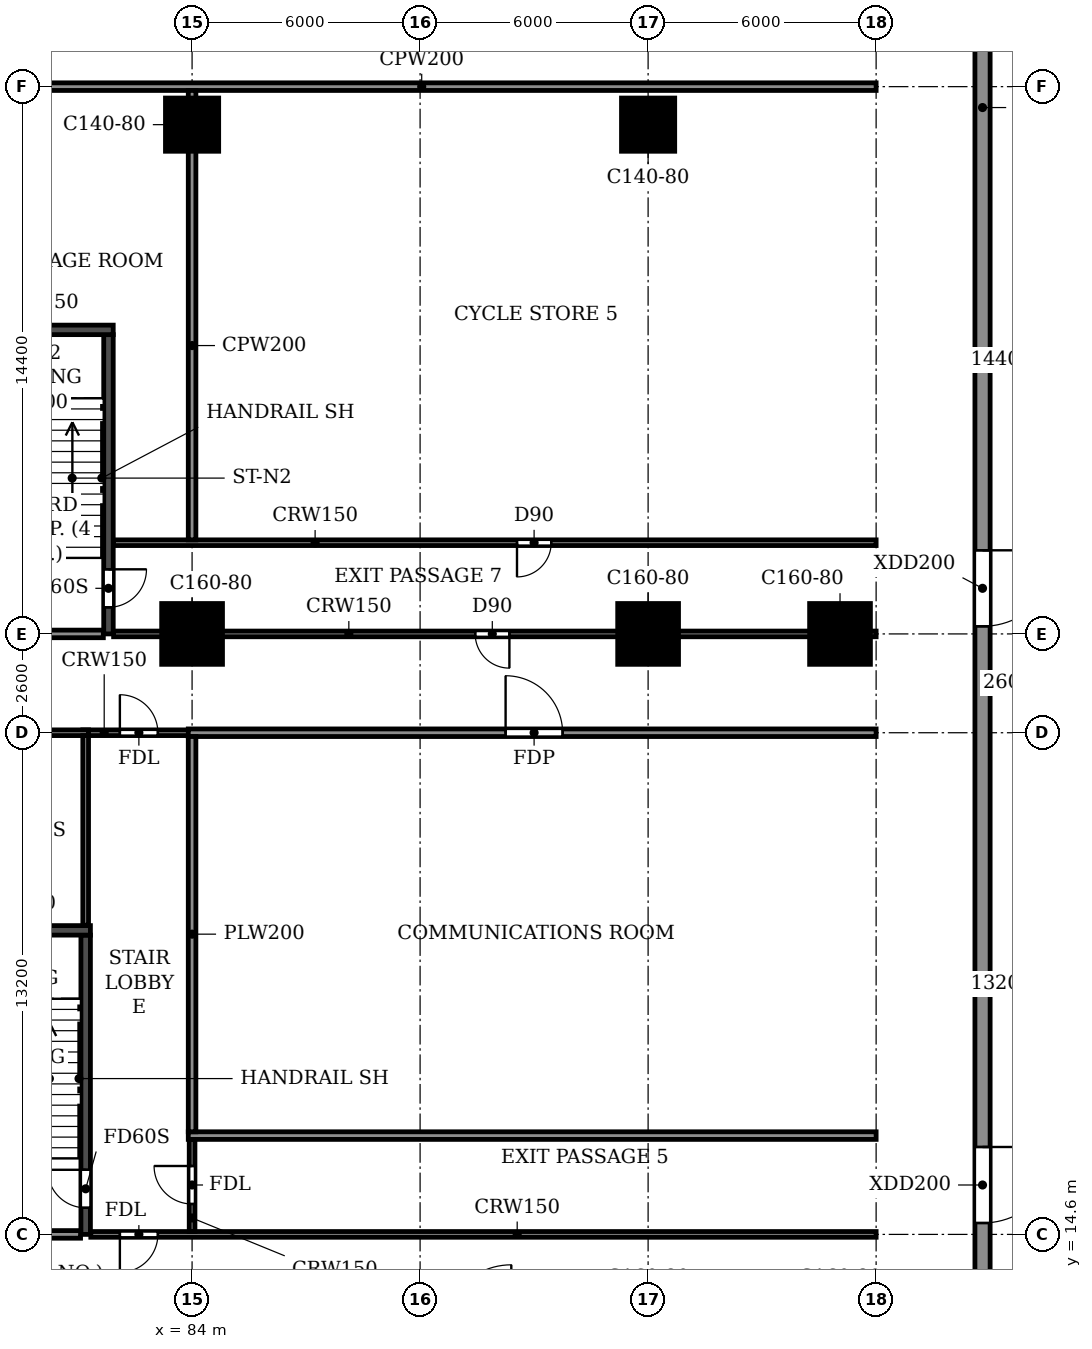
"""IFC4 building model, lengths in metres.
Left out: names, types, materials, properties, quantities, classifications, styles, units other than length and angle.
Written with IfcOpenShell. Run it as: python <this file> out.ifc"""

import sys

from ifc_helpers import new_model, si_unit, direction, frame, frame_2d, origin, origin_2d, place, context, subcontext, project, spatial, rectangle, extrude, source, transform, mapped, element, fill, save


model = new_model("IFC4")
c1 = context("Model", 3, precision=1e-05, world=origin(), true_north=direction((0.0, 1.0)))
c2 = subcontext(c1, "Body", "Model", "MODEL_VIEW")
j1 = project(units=[si_unit("LENGTHUNIT", "METRE"), si_unit("PLANEANGLEUNIT", "RADIAN")], contexts=[c1])
p1 = place(None, origin())
s1 = spatial("IfcSite", under=j1, at=p1, CompositionType="ELEMENT")
p2 = place(p1, origin())
s2 = spatial("IfcBuilding", under=s1, at=p2, CompositionType="ELEMENT")
p3 = place(p2, origin())
s3 = spatial("IfcBuildingStorey", under=s2, at=p3, CompositionType="ELEMENT", Elevation=0.0)
m1 = source(origin(), c2, "Body", "SweptSolid", [
    extrude(rectangle(XDim=1.6, YDim=1.6, at=origin_2d()), origin(), (0.0, 0.0, 1.0), 4.5),
])
p4 = place(p3, frame((84.0, 30.4, -0.3), z_axis=(0.0, 0.0, 1.0), x_axis=(1.0, 0.0, 0.0)))
e1 = element("IfcColumn", 1, at=p4, inside=s3, PredefinedType="COLUMN", context=c2, shape_type="MappedRepresentation", body=[
    mapped(m1, transform((0.0, 0.0, 0.0))),
])
m2 = source(origin(), c2, "Body", "SweptSolid", [
    extrude(rectangle(XDim=1.4, YDim=1.4, at=origin_2d()), origin(), (0.0, 0.0, 1.0), 4.5),
])
p5 = place(p3, frame((84.0, 43.8, -0.3), z_axis=(0.0, 0.0, 1.0), x_axis=(1.0, 0.0, 0.0)))
e2 = element("IfcColumn", 2, at=p5, inside=s3, PredefinedType="COLUMN", context=c2, shape_type="MappedRepresentation", body=[
    mapped(m2, transform((0.0, 0.0, 0.0))),
])
p6 = place(p3, frame((96.0, 30.4, -0.3), z_axis=(0.0, 0.0, 1.0), x_axis=(1.0, 0.0, 0.0)))
e3 = element("IfcColumn", 3, at=p6, inside=s3, PredefinedType="COLUMN", context=c2, shape_type="MappedRepresentation", body=[
    mapped(m1, transform((0.0, 0.0, 0.0))),
])
p7 = place(p3, frame((96.0, 43.8, -0.3), z_axis=(0.0, 0.0, 1.0), x_axis=(1.0, 0.0, 0.0)))
e4 = element("IfcColumn", 4, at=p7, inside=s3, PredefinedType="COLUMN", context=c2, shape_type="MappedRepresentation", body=[
    mapped(m2, transform((0.0, 0.0, 0.0))),
])
p8 = place(p3, frame((101.05, 30.4, -0.3), z_axis=(0.0, 0.0, 1.0), x_axis=(1.0, 0.0, 0.0)))
e5 = element("IfcColumn", 5, at=p8, inside=s3, PredefinedType="COLUMN", context=c2, shape_type="MappedRepresentation", body=[
    mapped(m1, transform((0.0, 0.0, 0.0))),
])
p9 = place(p3, frame((81.2, 14.6, 0.0), z_axis=(0.0, 0.0, 1.0), x_axis=(0.0, 1.0, 0.0)))
e6 = element("IfcWall", 6, at=p9, inside=s3, PredefinedType="SOLIDWALL", context=c2, shape_type="SweptSolid", body=[
    extrude(rectangle(XDim=7.875, YDim=0.25, at=frame_2d((3.938, 0.0))), origin(), (0.0, 0.0, 1.0), 4.2),
])
p10 = place(p9, frame((0.7, 0.0, 0.0)))
e7 = element("IfcOpeningElement", 7, at=p10, cuts=e6, PredefinedType="OPENING", context=c2, shape_type="SweptSolid", body=[
    extrude(rectangle(XDim=1.0, YDim=2.1, at=frame_2d((0.5, 1.05))), frame((0.0, 0.135, 0.0), z_axis=(0.0, -1.0, 0.0), x_axis=(1.0, 0.0, 0.0)), (0.0, 0.0, 1.0), 0.27),
])
p11 = place(p3, frame((77.275, 22.6, 0.0), z_axis=(0.0, 0.0, 1.0), x_axis=(1.0, 0.0, 0.0)))
e8 = element("IfcWall", 8, at=p11, inside=s3, PredefinedType="SOLIDWALL", context=c2, shape_type="SweptSolid", body=[
    extrude(rectangle(XDim=4.05, YDim=0.25, at=frame_2d((2.025, 0.0))), origin(), (0.0, 0.0, 1.0), 4.2),
])
p12 = place(p3, frame((81.8, 30.4, 0.0), z_axis=(0.0, 0.0, 1.0), x_axis=(0.0, 1.0, 0.0)))
e9 = element("IfcWall", 9, at=p12, inside=s3, PredefinedType="SOLIDWALL", context=c2, shape_type="SweptSolid", body=[
    extrude(rectangle(XDim=7.875, YDim=0.25, at=frame_2d((3.938, 0.0))), origin(), (0.0, 0.0, 1.0), 4.2),
])
p13 = place(p12, frame((0.7, 0.0, 0.0)))
e10 = element("IfcOpeningElement", 10, at=p13, cuts=e9, PredefinedType="OPENING", context=c2, shape_type="SweptSolid", body=[
    extrude(rectangle(XDim=1.0, YDim=2.1, at=frame_2d((0.5, 1.05))), frame((0.0, 0.135, 0.0), z_axis=(0.0, -1.0, 0.0), x_axis=(1.0, 0.0, 0.0)), (0.0, 0.0, 1.0), 0.27),
])
p14 = place(p3, frame((77.875, 38.4, 0.0), z_axis=(0.0, 0.0, 1.0), x_axis=(1.0, 0.0, 0.0)))
e11 = element("IfcWall", 11, at=p14, inside=s3, PredefinedType="SOLIDWALL", context=c2, shape_type="SweptSolid", body=[
    extrude(rectangle(XDim=4.05, YDim=0.25, at=frame_2d((2.025, 0.0))), origin(), (0.0, 0.0, 1.0), 4.2),
])
p15 = place(p3, frame((104.8, 0.2, 0.0), z_axis=(0.0, 0.0, 1.0), x_axis=(0.0, 1.0, 0.0)))
e12 = element("IfcWall", 12, at=p15, inside=s3, PredefinedType="STANDARD", context=c2, shape_type="SweptSolid", body=[
    extrude(rectangle(XDim=74.4, YDim=0.4, at=frame_2d((37.2, 0.0))), origin(), (0.0, 0.0, 1.0), 5.68),
])
p16 = place(p15, frame((67.1, 0.0, 0.9)))
e13 = element("IfcOpeningElement", 13, at=p16, cuts=e12, PredefinedType="OPENING", context=c2, shape_type="SweptSolid", body=[
    extrude(rectangle(XDim=2.2, YDim=2.7, at=frame_2d((1.1, 1.35))), frame((0.0, 0.21, 0.0), z_axis=(0.0, -1.0, 0.0), x_axis=(1.0, 0.0, 0.0)), (0.0, 0.0, 1.0), 0.42),
])
p17 = place(p15, frame((56.3, 0.0, 0.0)))
e14 = element("IfcOpeningElement", 14, at=p17, cuts=e12, PredefinedType="OPENING", context=c2, shape_type="SweptSolid", body=[
    extrude(rectangle(XDim=3.6, YDim=4.5, at=frame_2d((1.8, 2.25))), frame((0.0, 0.21, 0.0), z_axis=(0.0, -1.0, 0.0), x_axis=(1.0, 0.0, 0.0)), (0.0, 0.0, 1.0), 0.42),
])
p18 = place(p15, frame((60.3, 0.0, 0.0)))
e15 = element("IfcOpeningElement", 15, at=p18, cuts=e12, PredefinedType="OPENING", context=c2, shape_type="SweptSolid", body=[
    extrude(rectangle(XDim=1.0, YDim=2.1, at=frame_2d((0.5, 1.05))), frame((0.0, 0.21, 0.0), z_axis=(0.0, -1.0, 0.0), x_axis=(1.0, 0.0, 0.0)), (0.0, 0.0, 1.0), 0.42),
])
p19 = place(p15, frame((14.7, 0.0, 0.0)))
e16 = element("IfcOpeningElement", 16, at=p19, cuts=e12, PredefinedType="OPENING", context=c2, shape_type="SweptSolid", body=[
    extrude(rectangle(XDim=2.0, YDim=2.4, at=frame_2d((1.0, 1.2))), frame((0.0, 0.21, 0.0), z_axis=(0.0, -1.0, 0.0), x_axis=(1.0, 0.0, 0.0)), (0.0, 0.0, 1.0), 0.42),
])
p20 = place(p15, frame((30.4, 0.0, 0.0)))
e17 = element("IfcOpeningElement", 17, at=p20, cuts=e12, PredefinedType="OPENING", context=c2, shape_type="SweptSolid", body=[
    extrude(rectangle(XDim=2.0, YDim=2.4, at=frame_2d((1.0, 1.2))), frame((0.0, 0.21, 0.0), z_axis=(0.0, -1.0, 0.0), x_axis=(1.0, 0.0, 0.0)), (0.0, 0.0, 1.0), 0.42),
])
p21 = place(p3, frame((81.335, 14.6, 0.0), z_axis=(0.0, 0.0, 1.0), x_axis=(1.0, 0.0, 0.0)))
e18 = element("IfcWall", 18, at=p21, inside=s3, PredefinedType="PARTITIONING", context=c2, shape_type="SweptSolid", body=[
    extrude(rectangle(XDim=20.665, YDim=0.15, at=frame_2d((10.333, 0.0))), origin(), (0.0, 0.0, 1.0), 4.2),
])
p22 = place(p21, frame((0.765, 0.0, 0.0)))
e19 = element("IfcOpeningElement", 19, at=p22, cuts=e18, PredefinedType="OPENING", context=c2, shape_type="SweptSolid", body=[
    extrude(rectangle(XDim=1.0, YDim=2.1, at=frame_2d((0.5, 1.05))), frame((0.0, 0.085, 0.0), z_axis=(0.0, -1.0, 0.0), x_axis=(1.0, 0.0, 0.0)), (0.0, 0.0, 1.0), 0.17),
])
p23 = place(p3, frame((81.125, 27.8, 0.0), z_axis=(0.0, 0.0, 1.0), x_axis=(1.0, 0.0, 0.0)))
e20 = element("IfcWall", 20, at=p23, inside=s3, PredefinedType="PARTITIONING", context=c2, shape_type="SweptSolid", body=[
    extrude(rectangle(XDim=2.975, YDim=0.15, at=frame_2d((1.488, 0.0))), origin(), (0.0, 0.0, 1.0), 4.2),
])
p24 = place(p23, frame((0.975, 0.0, 0.0)))
e21 = element("IfcOpeningElement", 21, at=p24, cuts=e20, PredefinedType="OPENING", context=c2, shape_type="SweptSolid", body=[
    extrude(rectangle(XDim=1.0, YDim=2.1, at=frame_2d((0.5, 1.05))), frame((0.0, 0.085, 0.0), z_axis=(0.0, -1.0, 0.0), x_axis=(1.0, 0.0, 0.0)), (0.0, 0.0, 1.0), 0.17),
])
p25 = place(p3, frame((81.935, 30.4, 0.0), z_axis=(0.0, 0.0, 1.0), x_axis=(1.0, 0.0, 0.0)))
e22 = element("IfcWall", 22, at=p25, inside=s3, PredefinedType="PARTITIONING", context=c2, shape_type="SweptSolid", body=[
    extrude(rectangle(XDim=20.065, YDim=0.15, at=frame_2d((10.032, 0.0))), origin(), (0.0, 0.0, 1.0), 4.2),
])
p26 = place(p25, frame((9.515, 0.0, 0.0)))
e23 = element("IfcOpeningElement", 23, at=p26, cuts=e22, PredefinedType="OPENING", context=c2, shape_type="SweptSolid", body=[
    extrude(rectangle(XDim=0.9, YDim=2.1, at=frame_2d((0.45, 1.05))), frame((0.0, 0.085, 0.0), z_axis=(0.0, -1.0, 0.0), x_axis=(1.0, 0.0, 0.0)), (0.0, 0.0, 1.0), 0.17),
])
p27 = place(p3, frame((81.935, 32.8, 0.0), z_axis=(0.0, 0.0, 1.0), x_axis=(1.0, 0.0, 0.0)))
e24 = element("IfcWall", 24, at=p27, inside=s3, PredefinedType="PARTITIONING", context=c2, shape_type="SweptSolid", body=[
    extrude(rectangle(XDim=20.065, YDim=0.15, at=frame_2d((10.032, 0.0))), origin(), (0.0, 0.0, 1.0), 4.2),
])
p28 = place(p27, frame((10.615, 0.0, 0.0)))
e25 = element("IfcOpeningElement", 25, at=p28, cuts=e24, PredefinedType="OPENING", context=c2, shape_type="SweptSolid", body=[
    extrude(rectangle(XDim=0.9, YDim=2.1, at=frame_2d((0.45, 1.05))), frame((0.0, 0.085, 0.0), z_axis=(0.0, -1.0, 0.0), x_axis=(1.0, 0.0, 0.0)), (0.0, 0.0, 1.0), 0.17),
])
p29 = place(p3, frame((84.0, 14.675, 0.0), z_axis=(0.0, 0.0, 1.0), x_axis=(0.0, 1.0, 0.0)))
e26 = element("IfcWall", 26, at=p29, inside=s3, PredefinedType="PARTITIONING", context=c2, shape_type="SweptSolid", body=[
    extrude(rectangle(XDim=2.425, YDim=0.15, at=frame_2d((1.212, 0.0))), origin(), (0.0, 0.0, 1.0), 4.2),
])
p30 = place(p29, frame((0.725, 0.0, 0.0)))
e27 = element("IfcOpeningElement", 27, at=p30, cuts=e26, PredefinedType="OPENING", context=c2, shape_type="SweptSolid", body=[
    extrude(rectangle(XDim=1.0, YDim=2.1, at=frame_2d((0.5, 1.05))), frame((0.0, 0.085, 0.0), z_axis=(0.0, -1.0, 0.0), x_axis=(1.0, 0.0, 0.0)), (0.0, 0.0, 1.0), 0.17),
])
p31 = place(p3, frame((83.9, 17.2, 0.0), z_axis=(0.0, 0.0, 1.0), x_axis=(1.0, 0.0, 0.0)))
e28 = element("IfcWall", 28, at=p31, inside=s3, PredefinedType="PARTITIONING", context=c2, shape_type="SweptSolid", body=[
    extrude(rectangle(XDim=18.1, YDim=0.2, at=frame_2d((9.05, 0.0))), origin(), (0.0, 0.0, 1.0), 4.2),
])
p32 = place(p3, frame((83.9, 27.8, 0.0), z_axis=(0.0, 0.0, 1.0), x_axis=(1.0, 0.0, 0.0)))
e29 = element("IfcWall", 29, at=p32, inside=s3, PredefinedType="PARTITIONING", context=c2, shape_type="SweptSolid", body=[
    extrude(rectangle(XDim=18.1, YDim=0.2, at=frame_2d((9.05, 0.0))), origin(), (0.0, 0.0, 1.0), 4.2),
])
p33 = place(p32, frame((8.35, 0.0, 0.0)))
e30 = element("IfcOpeningElement", 30, at=p33, cuts=e29, PredefinedType="OPENING", context=c2, shape_type="SweptSolid", body=[
    extrude(rectangle(XDim=1.5, YDim=2.1, at=frame_2d((0.75, 1.05))), frame((0.0, 0.11, 0.0), z_axis=(0.0, -1.0, 0.0), x_axis=(1.0, 0.0, 0.0)), (0.0, 0.0, 1.0), 0.22),
])
p34 = place(p3, frame((84.0, 17.3, 0.0), z_axis=(0.0, 0.0, 1.0), x_axis=(0.0, 1.0, 0.0)))
e31 = element("IfcWall", 31, at=p34, inside=s3, PredefinedType="PARTITIONING", context=c2, shape_type="SweptSolid", body=[
    extrude(rectangle(XDim=10.4, YDim=0.2, at=frame_2d((5.2, 0.0))), origin(), (0.0, 0.0, 1.0), 4.2),
])
p35 = place(p3, frame((77.925, 44.8, 0.0), z_axis=(0.0, 0.0, 1.0), x_axis=(1.0, 0.0, 0.0)))
e32 = element("IfcWall", 32, at=p35, inside=s3, PredefinedType="PARTITIONING", context=c2, shape_type="SweptSolid", body=[
    extrude(rectangle(XDim=24.075, YDim=0.2, at=frame_2d((12.038, 0.0))), origin(), (0.0, 0.0, 1.0), 4.2),
])
p36 = place(p3, frame((84.0, 32.875, 0.0), z_axis=(0.0, 0.0, 1.0), x_axis=(0.0, 1.0, 0.0)))
e33 = element("IfcWall", 33, at=p36, inside=s3, PredefinedType="PARTITIONING", context=c2, shape_type="SweptSolid", body=[
    extrude(rectangle(XDim=11.825, YDim=0.2, at=frame_2d((5.913, 0.0))), origin(), (0.0, 0.0, 1.0), 4.2),
])
p37 = place(p3, frame((77.325, 27.8, 0.0), z_axis=(0.0, 0.0, 1.0), x_axis=(1.0, 0.0, 0.0)))
e34 = element("IfcWall", 34, at=p37, inside=s3, PredefinedType="PARTITIONING", context=c2, shape_type="SweptSolid", body=[
    extrude(rectangle(XDim=3.95, YDim=0.15, at=frame_2d((1.975, 0.0))), origin(), (0.0, 0.0, 1.0), 4.2),
])
p38 = place(p37, frame((1.525, 0.0, 0.0)))
e35 = element("IfcOpeningElement", 35, at=p38, cuts=e34, PredefinedType="OPENING", context=c2, shape_type="SweptSolid", body=[
    extrude(rectangle(XDim=0.9, YDim=2.1, at=frame_2d((0.45, 1.05))), frame((0.0, 0.085, 0.0), z_axis=(0.0, -1.0, 0.0), x_axis=(1.0, 0.0, 0.0)), (0.0, 0.0, 1.0), 0.17),
])
p39 = place(p3, frame((81.2, 22.735, 0.0), z_axis=(0.0, 0.0, 1.0), x_axis=(0.0, 1.0, 0.0)))
e36 = element("IfcWall", 36, at=p39, inside=s3, PredefinedType="PARTITIONING", context=c2, shape_type="SweptSolid", body=[
    extrude(rectangle(XDim=4.99, YDim=0.15, at=frame_2d((2.495, 0.0))), origin(), (0.0, 0.0, 1.0), 4.2),
])
for number, where, z_axis, x_axis in (
    (37, (77.535, 14.6, 0.0), (0.0, 0.0, 1.0), (1.0, 0.0, 0.0)),
    (38, (78.135, 30.4, 0.0), (0.0, 0.0, 1.0), (1.0, 0.0, 0.0)),
):
    element("IfcWall", number, at=place(p3, frame(where, z_axis=z_axis, x_axis=x_axis)), inside=s3, PredefinedType="PARTITIONING", context=c2, shape_type="SweptSolid", body=[
        extrude(rectangle(XDim=3.53, YDim=0.2, at=frame_2d((1.765, 0.0))), origin(), (0.0, 0.0, 1.0), 4.2),
    ])
p40 = place(p24, origin())
e39 = element("IfcDoor", 39, at=p40, inside=s3, OperationType="SINGLE_SWING_LEFT", PredefinedType="DOOR", context=c2, shape_type="SweptSolid", body=[
    extrude(rectangle(XDim=1.0, YDim=2.1, at=frame_2d((0.5, 1.05))), frame((0.0, 0.025, 0.0), z_axis=(0.0, -1.0, 0.0), x_axis=(1.0, 0.0, 0.0)), (0.0, 0.0, 1.0), 0.05),
])
fill(e21, e39)
p41 = place(p26, frame((0.9, 0.0, 0.0), z_axis=(0.0, 0.0, 1.0), x_axis=(-1.0, 0.0, 0.0)))
e40 = element("IfcDoor", 40, at=p41, inside=s3, OperationType="SINGLE_SWING_LEFT", PredefinedType="DOOR", context=c2, shape_type="SweptSolid", body=[
    extrude(rectangle(XDim=0.9, YDim=2.1, at=frame_2d((0.45, 1.05))), frame((0.0, 0.025, 0.0), z_axis=(0.0, -1.0, 0.0), x_axis=(1.0, 0.0, 0.0)), (0.0, 0.0, 1.0), 0.05),
])
fill(e23, e40)
p42 = place(p33, origin())
e41 = element("IfcDoor", 41, at=p42, inside=s3, OperationType="DOUBLE_DOOR_SINGLE_SWING", PredefinedType="DOOR", context=c2, shape_type="SweptSolid", body=[
    extrude(rectangle(XDim=1.5, YDim=2.1, at=frame_2d((0.75, 1.05))), frame((0.0, 0.025, 0.0), z_axis=(0.0, -1.0, 0.0), x_axis=(1.0, 0.0, 0.0)), (0.0, 0.0, 1.0), 0.05),
])
fill(e30, e41)
p43 = place(p22, frame((1.0, 0.0, 0.0), z_axis=(0.0, 0.0, 1.0), x_axis=(-1.0, 0.0, 0.0)))
e42 = element("IfcDoor", 42, at=p43, inside=s3, OperationType="SINGLE_SWING_RIGHT", PredefinedType="DOOR", context=c2, shape_type="SweptSolid", body=[
    extrude(rectangle(XDim=1.0, YDim=2.1, at=frame_2d((0.5, 1.05))), frame((0.0, 0.025, 0.0), z_axis=(0.0, -1.0, 0.0), x_axis=(1.0, 0.0, 0.0)), (0.0, 0.0, 1.0), 0.05),
])
fill(e19, e42)
p44 = place(p13, frame((1.0, 0.0, 0.0), z_axis=(0.0, 0.0, 1.0), x_axis=(-1.0, 0.0, 0.0)))
e43 = element("IfcDoor", 43, at=p44, inside=s3, OperationType="SINGLE_SWING_LEFT", PredefinedType="DOOR", context=c2, shape_type="SweptSolid", body=[
    extrude(rectangle(XDim=1.0, YDim=2.1, at=frame_2d((0.5, 1.05))), frame((0.0, 0.025, 0.0), z_axis=(0.0, -1.0, 0.0), x_axis=(1.0, 0.0, 0.0)), (0.0, 0.0, 1.0), 0.05),
])
fill(e10, e43)
p45 = place(p19, frame((2.0, 0.0, 0.0), z_axis=(0.0, 0.0, 1.0), x_axis=(-1.0, 0.0, 0.0)))
e44 = element("IfcDoor", 44, at=p45, inside=s3, OperationType="DOUBLE_DOOR_SINGLE_SWING", PredefinedType="DOOR", context=c2, shape_type="SweptSolid", body=[
    extrude(rectangle(XDim=2.0, YDim=2.4, at=frame_2d((1.0, 1.2))), frame((0.0, 0.025, 0.0), z_axis=(0.0, -1.0, 0.0), x_axis=(1.0, 0.0, 0.0)), (0.0, 0.0, 1.0), 0.05),
])
fill(e16, e44)
p46 = place(p28, frame((0.9, 0.0, 0.0), z_axis=(0.0, 0.0, 1.0), x_axis=(-1.0, 0.0, 0.0)))
e45 = element("IfcDoor", 45, at=p46, inside=s3, OperationType="SINGLE_SWING_RIGHT", PredefinedType="DOOR", context=c2, shape_type="SweptSolid", body=[
    extrude(rectangle(XDim=0.9, YDim=2.1, at=frame_2d((0.45, 1.05))), frame((0.0, 0.025, 0.0), z_axis=(0.0, -1.0, 0.0), x_axis=(1.0, 0.0, 0.0)), (0.0, 0.0, 1.0), 0.05),
])
fill(e25, e45)
p47 = place(p20, frame((2.0, 0.0, 0.0), z_axis=(0.0, 0.0, 1.0), x_axis=(-1.0, 0.0, 0.0)))
e46 = element("IfcDoor", 46, at=p47, inside=s3, OperationType="DOUBLE_DOOR_SINGLE_SWING", PredefinedType="DOOR", context=c2, shape_type="SweptSolid", body=[
    extrude(rectangle(XDim=2.0, YDim=2.4, at=frame_2d((1.0, 1.2))), frame((0.0, 0.025, 0.0), z_axis=(0.0, -1.0, 0.0), x_axis=(1.0, 0.0, 0.0)), (0.0, 0.0, 1.0), 0.05),
])
fill(e17, e46)
p48 = place(p10, origin())
e47 = element("IfcDoor", 47, at=p48, inside=s3, OperationType="SINGLE_SWING_RIGHT", PredefinedType="DOOR", context=c2, shape_type="SweptSolid", body=[
    extrude(rectangle(XDim=1.0, YDim=2.1, at=frame_2d((0.5, 1.05))), frame((0.0, 0.025, 0.0), z_axis=(0.0, -1.0, 0.0), x_axis=(1.0, 0.0, 0.0)), (0.0, 0.0, 1.0), 0.05),
])
fill(e7, e47)
p49 = place(p30, origin())
e48 = element("IfcDoor", 48, at=p49, inside=s3, OperationType="SINGLE_SWING_RIGHT", PredefinedType="DOOR", context=c2, shape_type="SweptSolid", body=[
    extrude(rectangle(XDim=1.0, YDim=2.1, at=frame_2d((0.5, 1.05))), frame((0.0, 0.025, 0.0), z_axis=(0.0, -1.0, 0.0), x_axis=(1.0, 0.0, 0.0)), (0.0, 0.0, 1.0), 0.05),
])
fill(e27, e48)
save(model, sys.argv[1])
